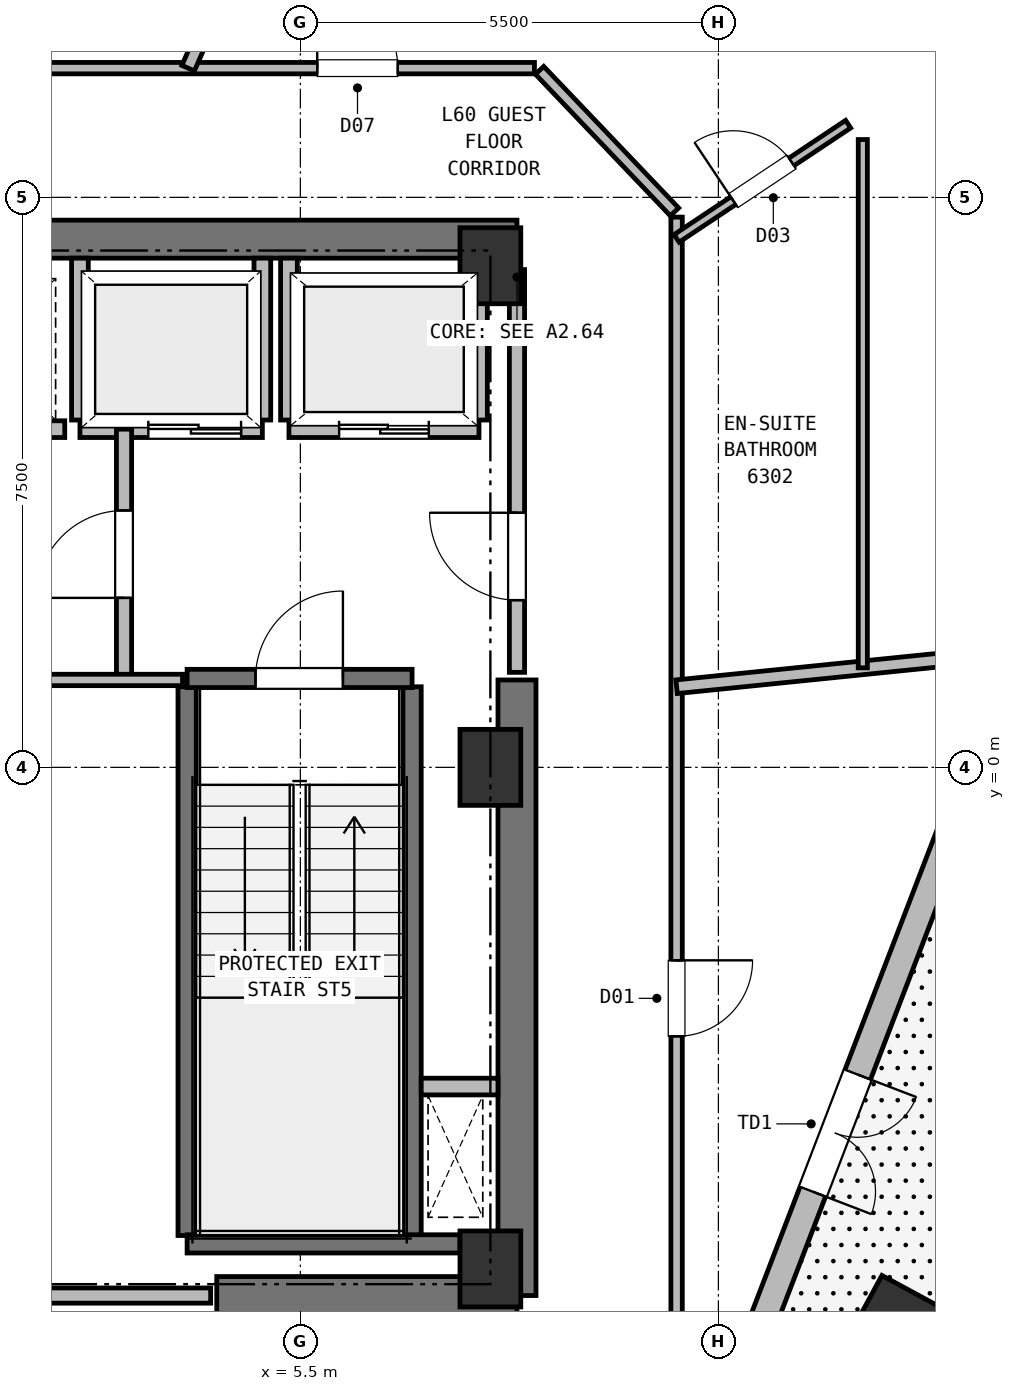
"""IFC4 building model, lengths in metres.
Left out: names, types, materials, properties, quantities, classifications, styles, units other than length and angle.
Written with IfcOpenShell. Run it as: python <this file> out.ifc"""

import sys

from ifc_helpers import new_model, si_unit, direction, frame, frame_2d, origin, origin_2d, place, context, subcontext, project, spatial, rectangle, extrude, element, fill, save


model = new_model("IFC4")
c1 = context("Model", 3, precision=1e-05, world=origin(), true_north=direction((0.0, 1.0)))
c2 = subcontext(c1, "Body", "Model", "MODEL_VIEW")
j1 = project(units=[si_unit("LENGTHUNIT", "METRE"), si_unit("PLANEANGLEUNIT", "RADIAN")], contexts=[c1])
p1 = place(None, origin())
s1 = spatial("IfcSite", under=j1, at=p1, CompositionType="ELEMENT")
p2 = place(p1, origin())
s2 = spatial("IfcBuilding", under=s1, at=p2, CompositionType="ELEMENT")
p3 = place(p2, frame((0.0, 0.0, 239.75)))
s3 = spatial("IfcBuildingStorey", under=s2, at=p3, CompositionType="ELEMENT", Elevation=239.75)
for number, where, z_axis, x_axis in (
    (1, (8.0, -6.6, 0.0), (0.0, 0.0, 1.0), (1.0, 0.0, 0.0)),
    (2, (8.0, 0.0, 0.0), (0.0, 0.0, 1.0), (1.0, 0.0, 0.0)),
    (3, (8.0, 6.6, 0.0), (0.0, 0.0, 1.0), (1.0, 0.0, 0.0)),
):
    element("IfcColumn", number, at=place(p3, frame(where, z_axis=z_axis, x_axis=x_axis)), inside=s3, PredefinedType="COLUMN", context=c2, shape_type="SweptSolid", body=[
        extrude(rectangle(XDim=0.8, YDim=1.0, at=origin_2d()), origin(), (0.0, 0.0, 1.0), 3.8),
    ])
p4 = place(p3, frame((-8.35, 6.95, 0.0), z_axis=(0.0, 0.0, 1.0), x_axis=(1.0, 0.0, 0.0)))
e4 = element("IfcWall", 4, at=p4, inside=s3, PredefinedType="SHEAR", context=c2, shape_type="SweptSolid", body=[
    extrude(rectangle(XDim=16.7, YDim=0.5, at=frame_2d((8.35, 0.0))), origin(), (0.0, 0.0, 1.0), 3.55),
])
p5 = place(p3, frame((4.4, -6.95, 0.0), z_axis=(0.0, 0.0, 1.0), x_axis=(1.0, 0.0, 0.0)))
e5 = element("IfcWall", 5, at=p5, inside=s3, PredefinedType="SHEAR", context=c2, shape_type="SweptSolid", body=[
    extrude(rectangle(XDim=3.95, YDim=0.5, at=frame_2d((1.975, 0.0))), origin(), (0.0, 0.0, 1.0), 3.55),
])
p6 = place(p3, frame((8.35, -6.95, 0.0), z_axis=(0.0, 0.0, 1.0), x_axis=(0.0, 1.0, 0.0)))
e6 = element("IfcWall", 6, at=p6, inside=s3, PredefinedType="SHEAR", context=c2, shape_type="SweptSolid", body=[
    extrude(rectangle(XDim=8.1, YDim=0.5, at=frame_2d((4.05, 0.0))), origin(), (0.0, 0.0, 1.0), 3.55),
])
p7 = place(p3, frame((13.4, -7.276, 0.0), z_axis=(0.0, 0.0, 1.0), x_axis=(0.47715876026, 0.878817112662, 0.0)))
e7 = element("IfcColumn", 7, at=p7, inside=s3, PredefinedType="COLUMN", context=c2, shape_type="SweptSolid", body=[
    extrude(rectangle(XDim=0.8, YDim=1.0, at=origin_2d()), origin(), (0.0, 0.0, 1.0), 3.8),
])
p8 = place(p3, frame((14.222, -0.425, 0.0), z_axis=(0.0, 0.0, 1.0), x_axis=(-0.358368113904, -0.933580363406, 0.0)))
e8 = element("IfcWall", 8, at=p8, inside=s3, PredefinedType="SOLIDWALL", context=c2, shape_type="SweptSolid", body=[
    extrude(rectangle(XDim=9.4, YDim=0.36, at=frame_2d((4.7, 0.0))), origin(), (0.0, 0.0, 1.0), 3.23),
])
p9 = place(p8, frame((3.875, 0.0, 0.0)))
e9 = element("IfcOpeningElement", 9, at=p9, cuts=e8, PredefinedType="OPENING", context=c2, shape_type="SweptSolid", body=[
    extrude(rectangle(XDim=1.65, YDim=2.25, at=frame_2d((0.825, 1.125))), frame((0.0, 0.19, 0.0), z_axis=(0.0, -1.0, 0.0), x_axis=(1.0, 0.0, 0.0)), (0.0, 0.0, 1.0), 0.38),
])
for number, where, z_axis, x_axis in (
    (10, (4.01, -6.16, 0.0), (0.0, 0.0, 1.0), (0.0, 1.0, 0.0)),
    (11, (6.97, -6.16, 0.0), (0.0, 0.0, 1.0), (0.0, 1.0, 0.0)),
):
    element("IfcWall", number, at=place(p3, frame(where, z_axis=z_axis, x_axis=x_axis)), inside=s3, PredefinedType="SHEAR", context=c2, shape_type="SweptSolid", body=[
        extrude(rectangle(XDim=7.22, YDim=0.24, at=frame_2d((3.61, 0.0))), origin(), (0.0, 0.0, 1.0), 3.55),
    ])
p10 = place(p3, frame((4.01, -6.27, 0.0), z_axis=(0.0, 0.0, 1.0), x_axis=(1.0, 0.0, 0.0)))
e12 = element("IfcWall", 12, at=p10, inside=s3, PredefinedType="SHEAR", context=c2, shape_type="SweptSolid", body=[
    extrude(rectangle(XDim=3.59, YDim=0.24, at=frame_2d((1.795, 0.0))), origin(), (0.0, 0.0, 1.0), 3.55),
])
p11 = place(p3, frame((4.01, 1.17, 0.0), z_axis=(0.0, 0.0, 1.0), x_axis=(1.0, 0.0, 0.0)))
e13 = element("IfcWall", 13, at=p11, inside=s3, PredefinedType="SHEAR", context=c2, shape_type="SweptSolid", body=[
    extrude(rectangle(XDim=2.96, YDim=0.24, at=frame_2d((1.48, 0.0))), origin(), (0.0, 0.0, 1.0), 3.55),
])
p12 = place(p11, frame((0.9, 0.0, 0.0)))
e14 = element("IfcOpeningElement", 14, at=p12, cuts=e13, PredefinedType="OPENING", context=c2, shape_type="SweptSolid", body=[
    extrude(rectangle(XDim=1.15, YDim=2.15, at=frame_2d((0.575, 1.075))), frame((0.0, 0.13, 0.0), z_axis=(0.0, -1.0, 0.0), x_axis=(1.0, 0.0, 0.0)), (0.0, 0.0, 1.0), 0.26),
])
p13 = place(p3, frame((7.09, -4.2, 0.0), z_axis=(0.0, 0.0, 1.0), x_axis=(1.0, 0.0, 0.0)))
e15 = element("IfcWall", 15, at=p13, inside=s3, PredefinedType="PARTITIONING", context=c2, shape_type="SweptSolid", body=[
    extrude(rectangle(XDim=1.01, YDim=0.22, at=frame_2d((0.505, 0.0))), origin(), (0.0, 0.0, 1.0), 3.55),
])
p14 = place(p3, frame((5.35, 4.45, 0.0), z_axis=(0.0, 0.0, 1.0), x_axis=(1.0, 0.0, 0.0)))
e16 = element("IfcWall", 16, at=p14, inside=s3, PredefinedType="PARTITIONING", context=c2, shape_type="SweptSolid", body=[
    extrude(rectangle(XDim=2.5, YDim=0.22, at=frame_2d((1.25, 0.0))), origin(), (0.0, 0.0, 1.0), 3.55),
])
p15 = place(p14, frame((0.66, 0.0, 0.0)))
e17 = element("IfcOpeningElement", 17, at=p15, cuts=e16, PredefinedType="OPENING", context=c2, shape_type="SweptSolid", body=[
    extrude(rectangle(XDim=1.18, YDim=2.15, at=frame_2d((0.59, 1.075))), frame((0.0, 0.12, 0.0), z_axis=(0.0, -1.0, 0.0), x_axis=(1.0, 0.0, 0.0)), (0.0, 0.0, 1.0), 0.24),
])
p16 = place(p3, frame((5.35, 4.57, 0.0), z_axis=(0.0, 0.0, 1.0), x_axis=(0.0, 1.0, 0.0)))
e18 = element("IfcWall", 18, at=p16, inside=s3, PredefinedType="PARTITIONING", context=c2, shape_type="SweptSolid", body=[
    extrude(rectangle(XDim=2.13, YDim=0.22, at=frame_2d((1.065, 0.0))), origin(), (0.0, 0.0, 1.0), 3.55),
])
p17 = place(p3, frame((7.85, 4.57, 0.0), z_axis=(0.0, 0.0, 1.0), x_axis=(0.0, 1.0, 0.0)))
e19 = element("IfcWall", 19, at=p17, inside=s3, PredefinedType="PARTITIONING", context=c2, shape_type="SweptSolid", body=[
    extrude(rectangle(XDim=2.13, YDim=0.22, at=frame_2d((1.065, 0.0))), origin(), (0.0, 0.0, 1.0), 3.18),
])
p18 = place(p3, frame((2.6, 4.45, 0.0), z_axis=(0.0, 0.0, 1.0), x_axis=(1.0, 0.0, 0.0)))
e20 = element("IfcWall", 20, at=p18, inside=s3, PredefinedType="PARTITIONING", context=c2, shape_type="SweptSolid", body=[
    extrude(rectangle(XDim=2.4, YDim=0.22, at=frame_2d((1.2, 0.0))), origin(), (0.0, 0.0, 1.0), 3.55),
])
p19 = place(p18, frame((0.9, 0.0, 0.0)))
e21 = element("IfcOpeningElement", 21, at=p19, cuts=e20, PredefinedType="OPENING", context=c2, shape_type="SweptSolid", body=[
    extrude(rectangle(XDim=1.22, YDim=2.15, at=frame_2d((0.61, 1.075))), frame((0.0, 0.12, 0.0), z_axis=(0.0, -1.0, 0.0), x_axis=(1.0, 0.0, 0.0)), (0.0, 0.0, 1.0), 0.24),
])
for number, where, z_axis, x_axis in (
    (22, (2.6, 4.57, 0.0), (0.0, 0.0, 1.0), (0.0, 1.0, 0.0)),
    (23, (5.0, 4.57, 0.0), (0.0, 0.0, 1.0), (0.0, 1.0, 0.0)),
):
    element("IfcWall", number, at=place(p3, frame(where, z_axis=z_axis, x_axis=x_axis)), inside=s3, PredefinedType="PARTITIONING", context=c2, shape_type="SweptSolid", body=[
        extrude(rectangle(XDim=2.13, YDim=0.22, at=frame_2d((1.065, 0.0))), origin(), (0.0, 0.0, 1.0), 3.55),
    ])
p20 = place(p3, frame((0.2, 4.45, 0.0), z_axis=(0.0, 0.0, 1.0), x_axis=(1.0, 0.0, 0.0)))
e24 = element("IfcWall", 24, at=p20, inside=s3, PredefinedType="PARTITIONING", context=c2, shape_type="SweptSolid", body=[
    extrude(rectangle(XDim=2.2, YDim=0.22, at=frame_2d((1.1, 0.0))), origin(), (0.0, 0.0, 1.0), 3.55),
])
p21 = place(p3, frame((3.18, 1.15, 0.0), z_axis=(0.0, 0.0, 1.0), x_axis=(0.0, 1.0, 0.0)))
e25 = element("IfcWall", 25, at=p21, inside=s3, PredefinedType="PARTITIONING", context=c2, shape_type="SweptSolid", body=[
    extrude(rectangle(XDim=3.3, YDim=0.2, at=frame_2d((1.65, 0.0))), origin(), (0.0, 0.0, 1.0), 3.55),
])
p22 = place(p21, frame((1.08, 0.0, 0.0)))
e26 = element("IfcOpeningElement", 26, at=p22, cuts=e25, PredefinedType="OPENING", context=c2, shape_type="SweptSolid", body=[
    extrude(rectangle(XDim=1.15, YDim=2.15, at=frame_2d((0.575, 1.075))), frame((0.0, 0.11, 0.0), z_axis=(0.0, -1.0, 0.0), x_axis=(1.0, 0.0, 0.0)), (0.0, 0.0, 1.0), 0.22),
])
p23 = place(p3, frame((8.35, 1.25, 0.0), z_axis=(0.0, 0.0, 1.0), x_axis=(0.0, 1.0, 0.0)))
e27 = element("IfcWall", 27, at=p23, inside=s3, PredefinedType="PARTITIONING", context=c2, shape_type="SweptSolid", body=[
    extrude(rectangle(XDim=5.3, YDim=0.2, at=frame_2d((2.65, 0.0))), origin(), (0.0, 0.0, 1.0), 3.55),
])
p24 = place(p23, frame((0.95, 0.0, 0.0)))
e28 = element("IfcOpeningElement", 28, at=p24, cuts=e27, PredefinedType="OPENING", context=c2, shape_type="SweptSolid", body=[
    extrude(rectangle(XDim=1.15, YDim=2.15, at=frame_2d((0.575, 1.075))), frame((0.0, 0.11, 0.0), z_axis=(0.0, -1.0, 0.0), x_axis=(1.0, 0.0, 0.0)), (0.0, 0.0, 1.0), 0.22),
])
p25 = place(p3, frame((3.95, 1.15, 0.0), z_axis=(0.0, 0.0, 1.0), x_axis=(-1.0, 0.0, 0.0)))
e29 = element("IfcWall", 29, at=p25, inside=s3, PredefinedType="PARTITIONING", context=c2, shape_type="SweptSolid", body=[
    extrude(rectangle(XDim=7.9, YDim=0.15, at=frame_2d((3.95, 0.0))), origin(), (0.0, 0.0, 1.0), 3.55),
])
p26 = place(p25, frame((3.49, 0.0, 0.0)))
e30 = element("IfcOpeningElement", 30, at=p26, cuts=e29, PredefinedType="OPENING", context=c2, shape_type="SweptSolid", body=[
    extrude(rectangle(XDim=0.92, YDim=2.05, at=frame_2d((0.46, 1.025))), frame((0.0, 0.085, 0.0), z_axis=(0.0, -1.0, 0.0), x_axis=(1.0, 0.0, 0.0)), (0.0, 0.0, 1.0), 0.17),
])
p27 = place(p3, frame((-4.32, -6.95, 0.0), z_axis=(0.0, 0.0, 1.0), x_axis=(1.0, 0.0, 0.0)))
e31 = element("IfcWall", 31, at=p27, inside=s3, PredefinedType="PARTITIONING", context=c2, shape_type="SweptSolid", body=[
    extrude(rectangle(XDim=8.64, YDim=0.2, at=frame_2d((4.32, 0.0))), origin(), (0.0, 0.0, 1.0), 3.55),
])
p28 = place(p3, frame((10.45, 7.24, 0.0), z_axis=(0.0, 0.0, 1.0), x_axis=(0.0, -1.0, 0.0)))
e32 = element("IfcWall", 32, at=p28, inside=s3, PredefinedType="PARTITIONING", context=c2, shape_type="SweptSolid", body=[
    extrude(rectangle(XDim=14.48, YDim=0.15, at=frame_2d((7.24, 0.0))), origin(), (0.0, 0.0, 1.0), 3.55),
])
p29 = place(p28, frame((9.779, 0.0, 0.0)))
e33 = element("IfcOpeningElement", 33, at=p29, cuts=e32, PredefinedType="OPENING", context=c2, shape_type="SweptSolid", body=[
    extrude(rectangle(XDim=1.0, YDim=2.15, at=frame_2d((0.5, 1.075))), frame((0.0, 0.085, 0.0), z_axis=(0.0, -1.0, 0.0), x_axis=(1.0, 0.0, 0.0)), (0.0, 0.0, 1.0), 0.17),
])
p30 = place(p3, frame((8.648, 9.171, 0.0), z_axis=(0.0, 0.0, 1.0), x_axis=(0.689960858356, -0.723846678473, 0.0)))
e34 = element("IfcWall", 34, at=p30, inside=s3, PredefinedType="PARTITIONING", context=c2, shape_type="SweptSolid", body=[
    extrude(rectangle(XDim=2.572, YDim=0.15, at=frame_2d((1.286, 0.0))), origin(), (0.0, 0.0, 1.0), 3.55),
])
p31 = place(p3, frame((-8.58, 9.2, 0.0), z_axis=(0.0, 0.0, 1.0), x_axis=(1.0, 0.0, 0.0)))
e35 = element("IfcWall", 35, at=p31, inside=s3, PredefinedType="PARTITIONING", context=c2, shape_type="SweptSolid", body=[
    extrude(rectangle(XDim=17.16, YDim=0.15, at=frame_2d((8.58, 0.0))), origin(), (0.0, 0.0, 1.0), 3.55),
])
p32 = place(p31, frame((7.484, 0.0, 0.0)))
e36 = element("IfcOpeningElement", 36, at=p32, cuts=e35, PredefinedType="OPENING", context=c2, shape_type="SweptSolid", body=[
    extrude(rectangle(XDim=1.0, YDim=2.15, at=frame_2d((0.5, 1.075))), frame((0.0, 0.085, 0.0), z_axis=(0.0, -1.0, 0.0), x_axis=(1.0, 0.0, 0.0)), (0.0, 0.0, 1.0), 0.17),
])
p33 = place(p31, frame((14.302, 0.0, 0.0)))
e37 = element("IfcOpeningElement", 37, at=p33, cuts=e35, PredefinedType="OPENING", context=c2, shape_type="SweptSolid", body=[
    extrude(rectangle(XDim=1.06, YDim=2.15, at=frame_2d((0.53, 1.075))), frame((0.0, 0.085, 0.0), z_axis=(0.0, -1.0, 0.0), x_axis=(1.0, 0.0, 0.0)), (0.0, 0.0, 1.0), 0.17),
])
p34 = place(p3, frame((10.45, 1.061, 0.0), z_axis=(0.0, 0.0, 1.0), x_axis=(0.994889305672, 0.100971626999, 0.0)))
e38 = element("IfcWall", 38, at=p34, inside=s3, PredefinedType="PARTITIONING", context=c2, shape_type="SweptSolid", body=[
    extrude(rectangle(XDim=6.586, YDim=0.18, at=frame_2d((3.293, 0.0))), origin(), (0.0, 0.0, 1.0), 3.55),
])
p35 = place(p3, frame((10.45, 6.96, 0.0), z_axis=(0.0, 0.0, 1.0), x_axis=(0.832313360894, 0.554305393513, 0.0)))
e39 = element("IfcWall", 39, at=p35, inside=s3, PredefinedType="PARTITIONING", context=c2, shape_type="SweptSolid", body=[
    extrude(rectangle(XDim=2.712, YDim=0.12, at=frame_2d((1.356, 0.0))), origin(), (0.0, 0.0, 1.0), 3.55),
])
p36 = place(p35, frame((0.896, 0.0, 0.0)))
e40 = element("IfcOpeningElement", 40, at=p36, cuts=e39, PredefinedType="OPENING", context=c2, shape_type="SweptSolid", body=[
    extrude(rectangle(XDim=0.92, YDim=2.1, at=frame_2d((0.46, 1.05))), frame((0.0, 0.07, 0.0), z_axis=(0.0, -1.0, 0.0), x_axis=(1.0, 0.0, 0.0)), (0.0, 0.0, 1.0), 0.14),
])
p37 = place(p3, frame((12.9, 1.31, 0.0), z_axis=(0.0, 0.0, 1.0), x_axis=(0.0, 1.0, 0.0)))
e41 = element("IfcWall", 41, at=p37, inside=s3, PredefinedType="PARTITIONING", context=c2, shape_type="SweptSolid", body=[
    extrude(rectangle(XDim=6.951, YDim=0.12, at=frame_2d((3.476, 0.0))), origin(), (0.0, 0.0, 1.0), 3.55),
])
p38 = place(p3, frame((4.023, 9.2, 0.0), z_axis=(0.0, 0.0, 1.0), x_axis=(0.400689260614, 0.916214012351, 0.0)))
e42 = element("IfcWall", 42, at=p38, inside=s3, PredefinedType="PARTITIONING", context=c2, shape_type="SweptSolid", body=[
    extrude(rectangle(XDim=7.809, YDim=0.18, at=frame_2d((3.904, 0.0))), origin(), (0.0, 0.0, 1.0), 3.55),
])
p39 = place(p9, origin())
e43 = element("IfcDoor", 43, at=p39, inside=s3, OperationType="DOUBLE_DOOR_SINGLE_SWING", PredefinedType="DOOR", context=c2, shape_type="SweptSolid", body=[
    extrude(rectangle(XDim=1.65, YDim=2.25, at=frame_2d((0.825, 1.125))), frame((0.0, 0.025, 0.0), z_axis=(0.0, -1.0, 0.0), x_axis=(1.0, 0.0, 0.0)), (0.0, 0.0, 1.0), 0.05),
])
fill(e9, e43)
p40 = place(p12, origin())
e44 = element("IfcDoor", 44, at=p40, inside=s3, OperationType="SINGLE_SWING_RIGHT", PredefinedType="DOOR", context=c2, shape_type="SweptSolid", body=[
    extrude(rectangle(XDim=1.15, YDim=2.15, at=frame_2d((0.575, 1.075))), frame((0.0, 0.025, 0.0), z_axis=(0.0, -1.0, 0.0), x_axis=(1.0, 0.0, 0.0)), (0.0, 0.0, 1.0), 0.05),
])
fill(e14, e44)
p41 = place(p15, origin())
e45 = element("IfcDoor", 45, at=p41, inside=s3, OperationType="DOUBLE_DOOR_SLIDING", PredefinedType="DOOR", context=c2, shape_type="SweptSolid", body=[
    extrude(rectangle(XDim=1.18, YDim=2.15, at=frame_2d((0.59, 1.075))), frame((0.0, 0.025, 0.0), z_axis=(0.0, -1.0, 0.0), x_axis=(1.0, 0.0, 0.0)), (0.0, 0.0, 1.0), 0.05),
])
fill(e17, e45)
p42 = place(p19, origin())
e46 = element("IfcDoor", 46, at=p42, inside=s3, OperationType="DOUBLE_DOOR_SLIDING", PredefinedType="DOOR", context=c2, shape_type="SweptSolid", body=[
    extrude(rectangle(XDim=1.22, YDim=2.15, at=frame_2d((0.61, 1.075))), frame((0.0, 0.025, 0.0), z_axis=(0.0, -1.0, 0.0), x_axis=(1.0, 0.0, 0.0)), (0.0, 0.0, 1.0), 0.05),
])
fill(e21, e46)
p43 = place(p22, origin())
e47 = element("IfcDoor", 47, at=p43, inside=s3, OperationType="SINGLE_SWING_LEFT", PredefinedType="DOOR", context=c2, shape_type="SweptSolid", body=[
    extrude(rectangle(XDim=1.15, YDim=2.15, at=frame_2d((0.575, 1.075))), frame((0.0, 0.025, 0.0), z_axis=(0.0, -1.0, 0.0), x_axis=(1.0, 0.0, 0.0)), (0.0, 0.0, 1.0), 0.05),
])
fill(e26, e47)
p44 = place(p24, origin())
e48 = element("IfcDoor", 48, at=p44, inside=s3, OperationType="SINGLE_SWING_RIGHT", PredefinedType="DOOR", context=c2, shape_type="SweptSolid", body=[
    extrude(rectangle(XDim=1.15, YDim=2.15, at=frame_2d((0.575, 1.075))), frame((0.0, 0.025, 0.0), z_axis=(0.0, -1.0, 0.0), x_axis=(1.0, 0.0, 0.0)), (0.0, 0.0, 1.0), 0.05),
])
fill(e28, e48)
p45 = place(p36, origin())
e49 = element("IfcDoor", 49, at=p45, inside=s3, OperationType="SINGLE_SWING_LEFT", PredefinedType="DOOR", context=c2, shape_type="SweptSolid", body=[
    extrude(rectangle(XDim=0.92, YDim=2.1, at=frame_2d((0.46, 1.05))), frame((0.0, 0.025, 0.0), z_axis=(0.0, -1.0, 0.0), x_axis=(1.0, 0.0, 0.0)), (0.0, 0.0, 1.0), 0.05),
])
fill(e40, e49)
p46 = place(p29, origin())
e50 = element("IfcDoor", 50, at=p46, inside=s3, OperationType="SINGLE_SWING_LEFT", PredefinedType="DOOR", context=c2, shape_type="SweptSolid", body=[
    extrude(rectangle(XDim=1.0, YDim=2.15, at=frame_2d((0.5, 1.075))), frame((0.0, 0.025, 0.0), z_axis=(0.0, -1.0, 0.0), x_axis=(1.0, 0.0, 0.0)), (0.0, 0.0, 1.0), 0.05),
])
fill(e33, e50)
p47 = place(p33, origin())
e51 = element("IfcDoor", 51, at=p47, inside=s3, OperationType="SINGLE_SWING_LEFT", PredefinedType="DOOR", context=c2, shape_type="SweptSolid", body=[
    extrude(rectangle(XDim=1.06, YDim=2.15, at=frame_2d((0.53, 1.075))), frame((0.0, 0.025, 0.0), z_axis=(0.0, -1.0, 0.0), x_axis=(1.0, 0.0, 0.0)), (0.0, 0.0, 1.0), 0.05),
])
fill(e37, e51)
save(model, sys.argv[1])
